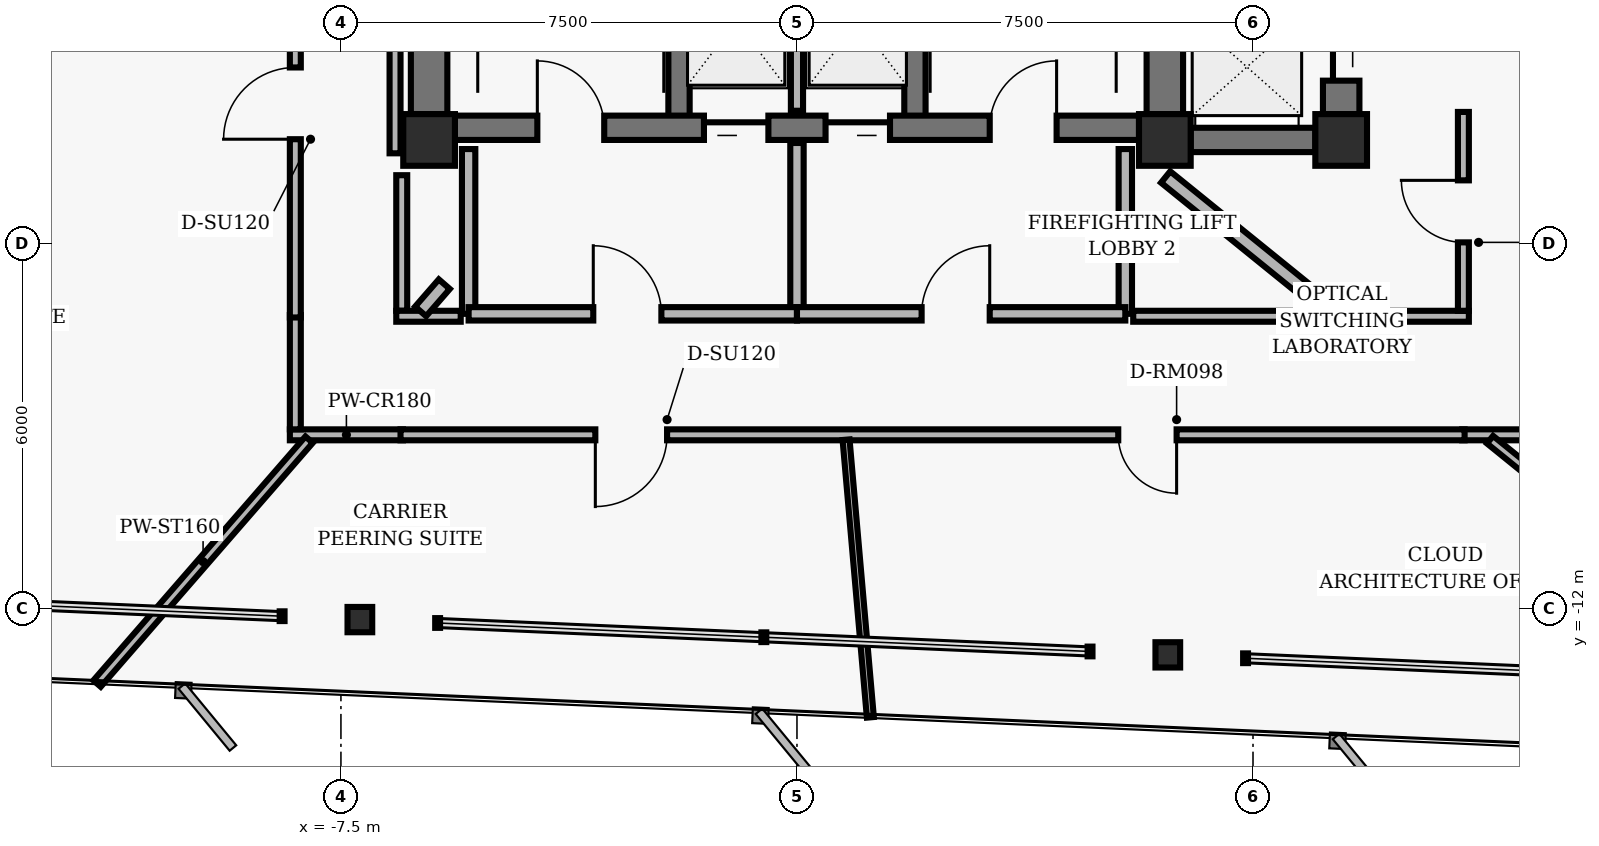
"""IFC4 building model, lengths in metres.
Left out: names, types, materials, properties, quantities, classifications, styles, units other than length and angle.
Written with IfcOpenShell. Run it as: python <this file> out.ifc"""

import sys

from ifc_helpers import new_model, si_unit, direction, frame, frame_2d, origin, origin_2d, place, context, subcontext, project, spatial, rectangle, hollow_rectangle, i_section, extrude, element, fill, save


model = new_model("IFC4")
c1 = context("Model", 3, precision=1e-05, world=origin(), true_north=direction((0.0, 1.0)))
c2 = subcontext(c1, "Body", "Model", "MODEL_VIEW")
j1 = project(units=[si_unit("LENGTHUNIT", "METRE"), si_unit("PLANEANGLEUNIT", "RADIAN")], contexts=[c1])
p1 = place(None, origin())
s1 = spatial("IfcSite", under=j1, at=p1, CompositionType="ELEMENT")
p2 = place(p1, origin())
s2 = spatial("IfcBuilding", under=s1, at=p2, CompositionType="ELEMENT")
p3 = place(p2, frame((0.0, 0.0, 125.92)))
s3 = spatial("IfcBuildingStorey", under=s2, at=p3, CompositionType="ELEMENT", Elevation=125.92)
for number, where, z_axis, x_axis in (
    (1, (-6.05, -4.3, 0.0), (0.0, 0.0, 1.0), (1.0, 0.0, 0.0)),
    (2, (6.05, -4.3, 0.0), (0.0, 0.0, 1.0), (1.0, 0.0, 0.0)),
    (3, (8.95, -4.3, 0.0), (0.0, 0.0, 1.0), (1.0, 0.0, 0.0)),
):
    element("IfcColumn", number, at=place(p3, frame(where, z_axis=z_axis, x_axis=x_axis)), inside=s3, PredefinedType="COLUMN", context=c2, shape_type="SweptSolid", body=[
        extrude(hollow_rectangle(XDim=0.85, YDim=0.85, WallThickness=0.055, InnerFilletRadius=0.02, OuterFilletRadius=0.04, at=origin_2d()), origin(), (0.0, 0.0, 1.0), 3.04),
    ])
for number, where, z_axis, x_axis in (
    (4, (-6.05, -3.875, 0.0), (0.0, 0.0, 1.0), (0.0, 1.0, 0.0)),
    (5, (6.05, -3.875, 0.0), (0.0, 0.0, 1.0), (0.0, 1.0, 0.0)),
):
    element("IfcWall", number, at=place(p3, frame(where, z_axis=z_axis, x_axis=x_axis)), inside=s3, PredefinedType="SHEAR", context=c2, shape_type="SweptSolid", body=[
        extrude(rectangle(XDim=3.45, YDim=0.6, at=frame_2d((1.725, 0.0))), origin(), (0.0, 0.0, 1.0), 2.788),
    ])
for number, where, z_axis, x_axis in (
    (6, (-1.94, -4.1, 0.0), (0.0, 0.0, 1.0), (0.0, 1.0, 0.0)),
    (7, (1.94, -4.1, 0.0), (0.0, 0.0, 1.0), (0.0, 1.0, 0.0)),
):
    element("IfcWall", number, at=place(p3, frame(where, z_axis=z_axis, x_axis=x_axis)), inside=s3, PredefinedType="SHEAR", context=c2, shape_type="SweptSolid", body=[
        extrude(rectangle(XDim=8.2, YDim=0.35, at=frame_2d((4.1, 0.0))), origin(), (0.0, 0.0, 1.0), 2.788),
    ])
p4 = place(p3, frame((-5.625, -4.1, 0.0), z_axis=(0.0, 0.0, 1.0), x_axis=(1.0, 0.0, 0.0)))
e8 = element("IfcWall", 8, at=p4, inside=s3, PredefinedType="SHEAR", context=c2, shape_type="SweptSolid", body=[
    extrude(rectangle(XDim=11.25, YDim=0.4, at=frame_2d((5.625, 0.0))), origin(), (0.0, 0.0, 1.0), 2.788),
])
p5 = place(p4, frame((1.355, 0.0, 0.0)))
e9 = element("IfcOpeningElement", 9, at=p5, cuts=e8, PredefinedType="OPENING", context=c2, shape_type="SweptSolid", body=[
    extrude(rectangle(XDim=1.1, YDim=2.04, at=frame_2d((0.55, 1.02))), frame((0.0, 0.21, 0.0), z_axis=(0.0, -1.0, 0.0), x_axis=(1.0, 0.0, 0.0)), (0.0, 0.0, 1.0), 0.42),
])
p6 = place(p4, frame((8.795, 0.0, 0.0)))
e10 = element("IfcOpeningElement", 10, at=p6, cuts=e8, PredefinedType="OPENING", context=c2, shape_type="SweptSolid", body=[
    extrude(rectangle(XDim=1.1, YDim=2.04, at=frame_2d((0.55, 1.02))), frame((0.0, 0.21, 0.0), z_axis=(0.0, -1.0, 0.0), x_axis=(1.0, 0.0, 0.0)), (0.0, 0.0, 1.0), 0.42),
])
p7 = place(p4, frame((4.095, 0.0, 0.0)))
e11 = element("IfcOpeningElement", 11, at=p7, cuts=e8, PredefinedType="OPENING", context=c2, shape_type="SweptSolid", body=[
    extrude(rectangle(XDim=1.06, YDim=2.04, at=frame_2d((0.53, 1.02))), frame((0.0, 0.21, 0.0), z_axis=(0.0, -1.0, 0.0), x_axis=(1.0, 0.0, 0.0)), (0.0, 0.0, 1.0), 0.42),
])
p8 = place(p4, frame((6.095, 0.0, 0.0)))
e12 = element("IfcOpeningElement", 12, at=p8, cuts=e8, PredefinedType="OPENING", context=c2, shape_type="SweptSolid", body=[
    extrude(rectangle(XDim=1.06, YDim=2.04, at=frame_2d((0.53, 1.02))), frame((0.0, 0.21, 0.0), z_axis=(0.0, -1.0, 0.0), x_axis=(1.0, 0.0, 0.0)), (0.0, 0.0, 1.0), 0.42),
])
p9 = place(p3, frame((8.95, -3.875, 0.0), z_axis=(0.0, 0.0, 1.0), x_axis=(0.0, 1.0, 0.0)))
e13 = element("IfcWall", 13, at=p9, inside=s3, PredefinedType="SHEAR", context=c2, shape_type="SweptSolid", body=[
    extrude(rectangle(XDim=7.95, YDim=0.6, at=frame_2d((3.975, 0.0))), origin(), (0.0, 0.0, 1.0), 2.788),
])
p10 = place(p9, frame((0.55, 0.0, 0.0)))
e14 = element("IfcOpeningElement", 14, at=p10, cuts=e13, PredefinedType="OPENING", context=c2, shape_type="SweptSolid", body=[
    extrude(rectangle(XDim=1.06, YDim=2.04, at=frame_2d((0.53, 1.02))), frame((0.0, 0.31, 0.0), z_axis=(0.0, -1.0, 0.0), x_axis=(1.0, 0.0, 0.0)), (0.0, 0.0, 1.0), 0.62),
])
p11 = place(p9, frame((3.445, 0.0, 0.0)))
e15 = element("IfcOpeningElement", 15, at=p11, cuts=e13, PredefinedType="OPENING", context=c2, shape_type="SweptSolid", body=[
    extrude(rectangle(XDim=1.06, YDim=2.04, at=frame_2d((0.53, 1.02))), frame((0.0, 0.31, 0.0), z_axis=(0.0, -1.0, 0.0), x_axis=(1.0, 0.0, 0.0)), (0.0, 0.0, 1.0), 0.62),
])
p12 = place(p9, frame((6.33, 0.0, 0.0)))
e16 = element("IfcOpeningElement", 16, at=p12, cuts=e13, PredefinedType="OPENING", context=c2, shape_type="SweptSolid", body=[
    extrude(rectangle(XDim=1.06, YDim=2.04, at=frame_2d((0.53, 1.02))), frame((0.0, 0.31, 0.0), z_axis=(0.0, -1.0, 0.0), x_axis=(1.0, 0.0, 0.0)), (0.0, 0.0, 1.0), 0.62),
])
p13 = place(p3, frame((6.475, -4.3, 0.0), z_axis=(0.0, 0.0, 1.0), x_axis=(1.0, 0.0, 0.0)))
e17 = element("IfcWall", 17, at=p13, inside=s3, PredefinedType="SHEAR", context=c2, shape_type="SweptSolid", body=[
    extrude(rectangle(XDim=2.05, YDim=0.4, at=frame_2d((1.025, 0.0))), origin(), (0.0, 0.0, 1.0), 2.788),
])
for number, where, z_axis, x_axis in (
    (18, (-7.188, -12.189, 0.0), (0.0, 0.0, 1.0), (1.0, 0.0, 0.0)),
    (19, (6.099, -12.769, 0.0), (0.0, 0.0, 1.0), (1.0, 0.0, 0.0)),
):
    element("IfcColumn", number, at=place(p3, frame(where, z_axis=z_axis, x_axis=x_axis)), inside=s3, PredefinedType="COLUMN", context=c2, shape_type="SweptSolid", body=[
        extrude(i_section(OverallWidth=0.406, OverallDepth=0.416, WebThickness=0.03, FlangeThickness=0.048, FilletRadius=0.02, at=origin_2d()), origin(), (0.0, 0.0, 1.0), 3.04),
    ])
p14 = place(p3, frame((0.0, -3.82, 0.0), z_axis=(0.0, 0.0, 1.0), x_axis=(0.0, 1.0, 0.0)))
e20 = element("IfcWall", 20, at=p14, inside=s3, PredefinedType="PARTITIONING", context=c2, shape_type="SweptSolid", body=[
    extrude(rectangle(XDim=2.67, YDim=0.2, at=frame_2d((1.335, 0.0))), origin(), (0.0, 0.0, 1.0), 2.763),
])
for number, where, z_axis, x_axis in (
    (21, (-5.4, -7.16, 0.0), (0.0, 0.0, 1.0), (0.0, 1.0, 0.0)),
    (22, (5.4, -7.16, 0.0), (0.0, 0.0, 1.0), (0.0, 1.0, 0.0)),
):
    element("IfcWall", number, at=place(p3, frame(where, z_axis=z_axis, x_axis=x_axis)), inside=s3, PredefinedType="PARTITIONING", context=c2, shape_type="SweptSolid", body=[
        extrude(rectangle(XDim=2.71, YDim=0.22, at=frame_2d((1.355, 0.0))), origin(), (0.0, 0.0, 1.0), 2.763),
    ])
p15 = place(p3, frame((0.0, -7.16, 0.0), z_axis=(0.0, 0.0, 1.0), x_axis=(0.0, 1.0, 0.0)))
e23 = element("IfcWall", 23, at=p15, inside=s3, PredefinedType="PARTITIONING", context=c2, shape_type="SweptSolid", body=[
    extrude(rectangle(XDim=2.81, YDim=0.22, at=frame_2d((1.405, 0.0))), origin(), (0.0, 0.0, 1.0), 2.763),
])
p16 = place(p3, frame((-5.4, -7.16, 0.0), z_axis=(0.0, 0.0, 1.0), x_axis=(1.0, 0.0, 0.0)))
e24 = element("IfcWall", 24, at=p16, inside=s3, PredefinedType="PARTITIONING", context=c2, shape_type="SweptSolid", body=[
    extrude(rectangle(XDim=5.4, YDim=0.22, at=frame_2d((2.7, 0.0))), origin(), (0.0, 0.0, 1.0), 2.33),
])
p17 = place(p16, frame((2.05, 0.0, 0.0)))
e25 = element("IfcOpeningElement", 25, at=p17, cuts=e24, PredefinedType="OPENING", context=c2, shape_type="SweptSolid", body=[
    extrude(rectangle(XDim=1.12, YDim=2.02, at=frame_2d((0.56, 1.01))), frame((0.0, 0.12, 0.0), z_axis=(0.0, -1.0, 0.0), x_axis=(1.0, 0.0, 0.0)), (0.0, 0.0, 1.0), 0.24),
])
p18 = place(p3, frame((0.0, -7.16, 0.0), z_axis=(0.0, 0.0, 1.0), x_axis=(1.0, 0.0, 0.0)))
e26 = element("IfcWall", 26, at=p18, inside=s3, PredefinedType="PARTITIONING", context=c2, shape_type="SweptSolid", body=[
    extrude(rectangle(XDim=5.4, YDim=0.22, at=frame_2d((2.7, 0.0))), origin(), (0.0, 0.0, 1.0), 2.33),
])
p19 = place(p18, frame((2.05, 0.0, 0.0)))
e27 = element("IfcOpeningElement", 27, at=p19, cuts=e26, PredefinedType="OPENING", context=c2, shape_type="SweptSolid", body=[
    extrude(rectangle(XDim=1.12, YDim=2.02, at=frame_2d((0.56, 1.01))), frame((0.0, 0.12, 0.0), z_axis=(0.0, -1.0, 0.0), x_axis=(1.0, 0.0, 0.0)), (0.0, 0.0, 1.0), 0.24),
])
p20 = place(p3, frame((-6.48, -9.15, 0.0), z_axis=(0.0, 0.0, 1.0), x_axis=(-1.0, 0.0, 0.0)))
e28 = element("IfcWall", 28, at=p20, inside=s3, PredefinedType="PARTITIONING", context=c2, shape_type="SweptSolid", body=[
    extrude(rectangle(XDim=1.86, YDim=0.18, at=frame_2d((0.93, 0.0))), origin(), (0.0, 0.0, 1.0), 2.33),
])
p21 = place(p3, frame((-8.25, -9.06, 0.0), z_axis=(0.0, 0.0, 1.0), x_axis=(0.0, 1.0, 0.0)))
e29 = element("IfcWall", 29, at=p21, inside=s3, PredefinedType="PARTITIONING", context=c2, shape_type="SweptSolid", body=[
    extrude(rectangle(XDim=1.88, YDim=0.18, at=frame_2d((0.94, 0.0))), origin(), (0.0, 0.0, 1.0), 2.763),
])
p22 = place(p3, frame((-8.25, -7.22, 0.0), z_axis=(0.0, 0.0, 1.0), x_axis=(0.0, 1.0, 0.0)))
e30 = element("IfcWall", 30, at=p22, inside=s3, PredefinedType="PARTITIONING", context=c2, shape_type="SweptSolid", body=[
    extrude(rectangle(XDim=14.44, YDim=0.18, at=frame_2d((7.22, 0.0))), origin(), (0.0, 0.0, 1.0), 2.763),
])
p23 = place(p22, frame((2.932, 0.0, 0.0)))
e31 = element("IfcOpeningElement", 31, at=p23, cuts=e30, PredefinedType="OPENING", context=c2, shape_type="SweptSolid", body=[
    extrude(rectangle(XDim=1.18, YDim=2.02, at=frame_2d((0.59, 1.01))), frame((0.0, 0.1, 0.0), z_axis=(0.0, -1.0, 0.0), x_axis=(1.0, 0.0, 0.0)), (0.0, 0.0, 1.0), 0.2),
])
p24 = place(p22, frame((9.892, 0.0, 0.0)))
e32 = element("IfcOpeningElement", 32, at=p24, cuts=e30, PredefinedType="OPENING", context=c2, shape_type="SweptSolid", body=[
    extrude(rectangle(XDim=1.18, YDim=2.02, at=frame_2d((0.59, 1.01))), frame((0.0, 0.1, 0.0), z_axis=(0.0, -1.0, 0.0), x_axis=(1.0, 0.0, 0.0)), (0.0, 0.0, 1.0), 0.2),
])
p25 = place(p3, frame((14.69, -9.15, 0.0), z_axis=(0.0, 0.0, 1.0), x_axis=(-1.0, 0.0, 0.0)))
e33 = element("IfcWall", 33, at=p25, inside=s3, PredefinedType="PARTITIONING", context=c2, shape_type="SweptSolid", body=[
    extrude(rectangle(XDim=3.75, YDim=0.18, at=frame_2d((1.875, 0.0))), origin(), (0.0, 0.0, 1.0), 2.33),
])
p26 = place(p3, frame((10.98, -9.15, 0.0), z_axis=(0.0, 0.0, 1.0), x_axis=(-1.0, 0.0, 0.0)))
e34 = element("IfcWall", 34, at=p26, inside=s3, PredefinedType="PARTITIONING", context=c2, shape_type="SweptSolid", body=[
    extrude(rectangle(XDim=17.5, YDim=0.18, at=frame_2d((8.75, 0.0))), origin(), (0.0, 0.0, 1.0), 2.33),
])
p27 = place(p26, frame((13.116, 0.0, 0.0)))
e35 = element("IfcOpeningElement", 35, at=p27, cuts=e34, PredefinedType="OPENING", context=c2, shape_type="SweptSolid", body=[
    extrude(rectangle(XDim=1.18, YDim=2.02, at=frame_2d((0.59, 1.01))), frame((0.0, 0.1, 0.0), z_axis=(0.0, -1.0, 0.0), x_axis=(1.0, 0.0, 0.0)), (0.0, 0.0, 1.0), 0.2),
])
p28 = place(p26, frame((4.736, 0.0, 0.0)))
e36 = element("IfcOpeningElement", 36, at=p28, cuts=e34, PredefinedType="OPENING", context=c2, shape_type="SweptSolid", body=[
    extrude(rectangle(XDim=0.96, YDim=2.02, at=frame_2d((0.48, 1.01))), frame((0.0, 0.1, 0.0), z_axis=(0.0, -1.0, 0.0), x_axis=(1.0, 0.0, 0.0)), (0.0, 0.0, 1.0), 0.2),
])
p29 = place(p3, frame((5.53, -7.2, 0.0), z_axis=(0.0, 0.0, 1.0), x_axis=(1.0, 0.0, 0.0)))
e37 = element("IfcWall", 37, at=p29, inside=s3, PredefinedType="PARTITIONING", context=c2, shape_type="SweptSolid", body=[
    extrude(rectangle(XDim=5.52, YDim=0.18, at=frame_2d((2.76, 0.0))), origin(), (0.0, 0.0, 1.0), 2.33),
])
p30 = place(p3, frame((10.96, -7.11, 0.0), z_axis=(0.0, 0.0, 1.0), x_axis=(0.0, 1.0, 0.0)))
e38 = element("IfcWall", 38, at=p30, inside=s3, PredefinedType="PARTITIONING", context=c2, shape_type="SweptSolid", body=[
    extrude(rectangle(XDim=3.271, YDim=0.18, at=frame_2d((1.635, 0.0))), origin(), (0.0, 0.0, 1.0), 2.763),
])
p31 = place(p30, frame((1.125, 0.0, 0.0)))
e39 = element("IfcOpeningElement", 39, at=p31, cuts=e38, PredefinedType="OPENING", context=c2, shape_type="SweptSolid", body=[
    extrude(rectangle(XDim=1.02, YDim=2.02, at=frame_2d((0.51, 1.01))), frame((0.0, 0.1, 0.0), z_axis=(0.0, -1.0, 0.0), x_axis=(1.0, 0.0, 0.0)), (0.0, 0.0, 1.0), 0.2),
])
p32 = place(p3, frame((-6.61, 4.94, 0.0), z_axis=(0.0, 0.0, 1.0), x_axis=(0.0, -1.0, 0.0)))
e40 = element("IfcWall", 40, at=p32, inside=s3, PredefinedType="PARTITIONING", context=c2, shape_type="SweptSolid", body=[
    extrude(rectangle(XDim=9.46, YDim=0.18, at=frame_2d((4.73, 0.0))), origin(), (0.0, 0.0, 1.0), 2.763),
])
p33 = place(p3, frame((-6.5, -4.88, 0.0), z_axis=(0.0, 0.0, 1.0), x_axis=(0.0, -1.0, 0.0)))
e41 = element("IfcWall", 41, at=p33, inside=s3, PredefinedType="PARTITIONING", context=c2, shape_type="SweptSolid", body=[
    extrude(rectangle(XDim=2.23, YDim=0.18, at=frame_2d((1.115, 0.0))), origin(), (0.0, 0.0, 1.0), 2.132),
])
p34 = place(p3, frame((-6.59, -7.2, 0.0), z_axis=(0.0, 0.0, 1.0), x_axis=(1.0, 0.0, 0.0)))
e42 = element("IfcWall", 42, at=p34, inside=s3, PredefinedType="PARTITIONING", context=c2, shape_type="SweptSolid", body=[
    extrude(rectangle(XDim=1.06, YDim=0.18, at=frame_2d((0.53, 0.0))), origin(), (0.0, 0.0, 1.0), 2.33),
])
p35 = place(p3, frame((-5.8, -6.672, 0.0), z_axis=(0.0, 0.0, 1.0), x_axis=(-0.655791573116, -0.754941992891, 0.0)))
e43 = element("IfcWall", 43, at=p35, inside=s3, PredefinedType="PARTITIONING", context=c2, shape_type="SweptSolid", body=[
    extrude(rectangle(XDim=0.594, YDim=0.24, at=frame_2d((0.297, 0.0))), origin(), (0.0, 0.0, 1.0), 2.763),
])
p36 = place(p3, frame((-8.023, -9.23, 0.0), z_axis=(0.0, 0.0, 1.0), x_axis=(-0.656052478168, -0.754715274716, 0.0)))
e44 = element("IfcWall", 44, at=p36, inside=s3, PredefinedType="PARTITIONING", context=c2, shape_type="SweptSolid", body=[
    extrude(rectangle(XDim=5.315, YDim=0.16, at=frame_2d((2.658, 0.0))), origin(), (0.0, 0.0, 1.0), 2.763),
])
p37 = place(p3, frame((0.808, -9.23, 0.0), z_axis=(0.0, 0.0, 1.0), x_axis=(0.087130613331, -0.996196896311, 0.0)))
e45 = element("IfcWall", 45, at=p37, inside=s3, PredefinedType="MOVABLE", context=c2, shape_type="SweptSolid", body=[
    extrude(rectangle(XDim=4.584, YDim=0.115, at=frame_2d((2.292, 0.0))), origin(), (0.0, 0.0, 1.0), 2.763),
])
p38 = place(p3, frame((6.063, -4.91, 0.0), z_axis=(0.0, 0.0, 1.0), x_axis=(0.777131535724, -0.629338204929, 0.0)))
e46 = element("IfcWall", 46, at=p38, inside=s3, PredefinedType="PARTITIONING", context=c2, shape_type="SweptSolid", body=[
    extrude(rectangle(XDim=3.512, YDim=0.24, at=frame_2d((1.756, 0.0))), origin(), (0.0, 0.0, 1.0), 2.763),
])
p39 = place(p3, frame((11.398, -9.23, 0.0), z_axis=(0.0, 0.0, 1.0), x_axis=(0.777150974354, -0.629314200588, 0.0)))
e47 = element("IfcWall", 47, at=p39, inside=s3, PredefinedType="PARTITIONING", context=c2, shape_type="SweptSolid", body=[
    extrude(rectangle(XDim=8.417, YDim=0.16, at=frame_2d((4.208, 0.0))), origin(), (0.0, 0.0, 1.0), 2.763),
])
p40 = place(p5, origin())
e48 = element("IfcDoor", 48, at=p40, inside=s3, OperationType="SINGLE_SWING_LEFT", PredefinedType="DOOR", context=c2, shape_type="SweptSolid", body=[
    extrude(rectangle(XDim=1.1, YDim=2.04, at=frame_2d((0.55, 1.02))), frame((0.0, 0.025, 0.0), z_axis=(0.0, -1.0, 0.0), x_axis=(1.0, 0.0, 0.0)), (0.0, 0.0, 1.0), 0.05),
])
fill(e9, e48)
p41 = place(p6, origin())
e49 = element("IfcDoor", 49, at=p41, inside=s3, OperationType="SINGLE_SWING_RIGHT", PredefinedType="DOOR", context=c2, shape_type="SweptSolid", body=[
    extrude(rectangle(XDim=1.1, YDim=2.04, at=frame_2d((0.55, 1.02))), frame((0.0, 0.025, 0.0), z_axis=(0.0, -1.0, 0.0), x_axis=(1.0, 0.0, 0.0)), (0.0, 0.0, 1.0), 0.05),
])
fill(e10, e49)
p42 = place(p7, origin())
e50 = element("IfcDoor", 50, at=p42, inside=s3, OperationType="SLIDING_TO_LEFT", PredefinedType="DOOR", context=c2, shape_type="SweptSolid", body=[
    extrude(rectangle(XDim=1.06, YDim=2.04, at=frame_2d((0.53, 1.02))), frame((0.0, 0.025, 0.0), z_axis=(0.0, -1.0, 0.0), x_axis=(1.0, 0.0, 0.0)), (0.0, 0.0, 1.0), 0.05),
])
fill(e11, e50)
p43 = place(p8, origin())
e51 = element("IfcDoor", 51, at=p43, inside=s3, OperationType="SLIDING_TO_RIGHT", PredefinedType="DOOR", context=c2, shape_type="SweptSolid", body=[
    extrude(rectangle(XDim=1.06, YDim=2.04, at=frame_2d((0.53, 1.02))), frame((0.0, 0.025, 0.0), z_axis=(0.0, -1.0, 0.0), x_axis=(1.0, 0.0, 0.0)), (0.0, 0.0, 1.0), 0.05),
])
fill(e12, e51)
p44 = place(p17, origin())
e52 = element("IfcDoor", 52, at=p44, inside=s3, OperationType="SINGLE_SWING_LEFT", PredefinedType="DOOR", context=c2, shape_type="SweptSolid", body=[
    extrude(rectangle(XDim=1.12, YDim=2.02, at=frame_2d((0.56, 1.01))), frame((0.0, 0.025, 0.0), z_axis=(0.0, -1.0, 0.0), x_axis=(1.0, 0.0, 0.0)), (0.0, 0.0, 1.0), 0.05),
])
fill(e25, e52)
p45 = place(p19, origin())
e53 = element("IfcDoor", 53, at=p45, inside=s3, OperationType="SINGLE_SWING_RIGHT", PredefinedType="DOOR", context=c2, shape_type="SweptSolid", body=[
    extrude(rectangle(XDim=1.12, YDim=2.02, at=frame_2d((0.56, 1.01))), frame((0.0, 0.025, 0.0), z_axis=(0.0, -1.0, 0.0), x_axis=(1.0, 0.0, 0.0)), (0.0, 0.0, 1.0), 0.05),
])
fill(e27, e53)
p46 = place(p10, origin())
e54 = element("IfcDoor", 54, at=p46, inside=s3, OperationType="SLIDING_TO_LEFT", PredefinedType="DOOR", context=c2, shape_type="SweptSolid", body=[
    extrude(rectangle(XDim=1.06, YDim=2.04, at=frame_2d((0.53, 1.02))), frame((0.0, 0.025, 0.0), z_axis=(0.0, -1.0, 0.0), x_axis=(1.0, 0.0, 0.0)), (0.0, 0.0, 1.0), 0.05),
])
fill(e14, e54)
p47 = place(p23, origin())
e55 = element("IfcDoor", 55, at=p47, inside=s3, OperationType="SINGLE_SWING_LEFT", PredefinedType="DOOR", context=c2, shape_type="SweptSolid", body=[
    extrude(rectangle(XDim=1.18, YDim=2.02, at=frame_2d((0.59, 1.01))), frame((0.0, 0.025, 0.0), z_axis=(0.0, -1.0, 0.0), x_axis=(1.0, 0.0, 0.0)), (0.0, 0.0, 1.0), 0.05),
])
fill(e31, e55)
p48 = place(p27, origin())
e56 = element("IfcDoor", 56, at=p48, inside=s3, OperationType="SINGLE_SWING_RIGHT", PredefinedType="DOOR", context=c2, shape_type="SweptSolid", body=[
    extrude(rectangle(XDim=1.18, YDim=2.02, at=frame_2d((0.59, 1.01))), frame((0.0, 0.025, 0.0), z_axis=(0.0, -1.0, 0.0), x_axis=(1.0, 0.0, 0.0)), (0.0, 0.0, 1.0), 0.05),
])
fill(e35, e56)
p49 = place(p28, origin())
e57 = element("IfcDoor", 57, at=p49, inside=s3, OperationType="SINGLE_SWING_LEFT", PredefinedType="DOOR", context=c2, shape_type="SweptSolid", body=[
    extrude(rectangle(XDim=0.96, YDim=2.02, at=frame_2d((0.48, 1.01))), frame((0.0, 0.025, 0.0), z_axis=(0.0, -1.0, 0.0), x_axis=(1.0, 0.0, 0.0)), (0.0, 0.0, 1.0), 0.05),
])
fill(e36, e57)
p50 = place(p31, origin())
e58 = element("IfcDoor", 58, at=p50, inside=s3, OperationType="SINGLE_SWING_RIGHT", PredefinedType="DOOR", context=c2, shape_type="SweptSolid", body=[
    extrude(rectangle(XDim=1.02, YDim=2.02, at=frame_2d((0.51, 1.01))), frame((0.0, 0.025, 0.0), z_axis=(0.0, -1.0, 0.0), x_axis=(1.0, 0.0, 0.0)), (0.0, 0.0, 1.0), 0.05),
])
fill(e39, e58)
save(model, sys.argv[1])
